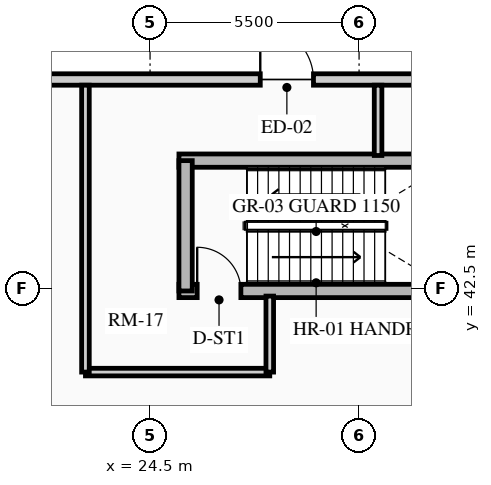
"""IFC4 building model, lengths in metres.
Left out: names, types, materials, properties, quantities, classifications, styles, units other than length and angle.
Written with IfcOpenShell. Run it as: python <this file> out.ifc"""

import sys

from ifc_helpers import new_model, si_unit, direction, frame, frame_2d, origin, place, context, subcontext, project, spatial, rectangle, extrude, source, transform, mapped, element, fill, save


model = new_model("IFC4")
c1 = context("Model", 3, precision=1e-05, world=origin(), true_north=direction((0.0, 1.0)))
c2 = subcontext(c1, "Body", "Model", "MODEL_VIEW")
j1 = project(units=[si_unit("LENGTHUNIT", "METRE"), si_unit("PLANEANGLEUNIT", "RADIAN")], contexts=[c1])
p1 = place(None, origin())
s1 = spatial("IfcSite", under=j1, at=p1, CompositionType="ELEMENT")
p2 = place(p1, origin())
s2 = spatial("IfcBuilding", under=s1, at=p2, CompositionType="ELEMENT")
p3 = place(p2, origin())
s3 = spatial("IfcBuildingStorey", under=s2, at=p3, CompositionType="ELEMENT", Elevation=0.0)
p4 = place(p3, frame((25.26, 42.435, 0.0), z_axis=(0.0, 0.0, 1.0), x_axis=(1.0, 0.0, 0.0)))
e1 = element("IfcWall", 1, at=p4, inside=s3, PredefinedType="SHEAR", context=c2, shape_type="SweptSolid", body=[
    extrude(rectangle(XDim=7.28, YDim=0.35, at=frame_2d((3.64, 0.0))), origin(), (0.0, 0.0, 1.0), 4.8),
])
m1 = source(origin(), c2, "Body", "SweptSolid", [
    extrude(rectangle(XDim=1.15, YDim=2.02, at=frame_2d((0.575, 1.01))), frame((0.0, 0.185, 0.0), z_axis=(0.0, -1.0, 0.0), x_axis=(1.0, 0.0, 0.0)), (0.0, 0.0, 1.0), 0.37),
])
p5 = place(p4, frame((0.48, 0.0, 0.0)))
e2 = element("IfcOpeningElement", 2, at=p5, cuts=e1, PredefinedType="OPENING", context=c2, shape_type="MappedRepresentation", body=[
    mapped(m1, transform((0.0, 0.0, 0.0), x_axis=(1.0, 0.0, 0.0), y_axis=(0.0, 1.0, 0.0), z_axis=(0.0, 0.0, 1.0), scale=1.0)),
])
p6 = place(p3, frame((25.26, 45.865, 0.0), z_axis=(0.0, 0.0, 1.0), x_axis=(1.0, 0.0, 0.0)))
e3 = element("IfcWall", 3, at=p6, inside=s3, PredefinedType="SHEAR", context=c2, shape_type="SweptSolid", body=[
    extrude(rectangle(XDim=7.28, YDim=0.35, at=frame_2d((3.64, 0.0))), origin(), (0.0, 0.0, 1.0), 4.8),
])
p7 = place(p3, frame((25.435, 42.435, 0.0), z_axis=(0.0, 0.0, 1.0), x_axis=(0.0, 1.0, 0.0)))
e4 = element("IfcWall", 4, at=p7, inside=s3, PredefinedType="SHEAR", context=c2, shape_type="SweptSolid", body=[
    extrude(rectangle(XDim=3.43, YDim=0.35, at=frame_2d((1.715, 0.0))), origin(), (0.0, 0.0, 1.0), 4.8),
])
p8 = place(p3, frame((3.8, 48.0, 0.0), z_axis=(0.0, 0.0, 1.0), x_axis=(1.0, 0.0, 0.0)))
e5 = element("IfcWall", 5, at=p8, inside=s3, PredefinedType="SOLIDWALL", context=c2, shape_type="SweptSolid", body=[
    extrude(rectangle(XDim=74.5, YDim=0.3, at=frame_2d((37.25, 0.0))), origin(), (0.0, 0.0, 1.0), 4.485),
])
m2 = source(origin(), c2, "Body", "SweptSolid", [
    extrude(rectangle(XDim=1.4, YDim=2.15, at=frame_2d((0.7, 1.075))), frame((0.0, 0.16, 0.0), z_axis=(0.0, -1.0, 0.0), x_axis=(1.0, 0.0, 0.0)), (0.0, 0.0, 1.0), 0.32),
])
p9 = place(p8, frame((8.2, 0.0, 0.0)))
e6 = element("IfcOpeningElement", 6, at=p9, cuts=e5, PredefinedType="OPENING", context=c2, shape_type="MappedRepresentation", body=[
    mapped(m2, transform((0.0, 0.0, 0.0), x_axis=(1.0, 0.0, 0.0), y_axis=(0.0, 1.0, 0.0), z_axis=(0.0, 0.0, 1.0), scale=1.0)),
])
m3 = source(origin(), c2, "Body", "SweptSolid", [
    extrude(rectangle(XDim=2.0, YDim=2.25, at=frame_2d((1.0, 1.125))), frame((0.0, 0.16, 0.0), z_axis=(0.0, -1.0, 0.0), x_axis=(1.0, 0.0, 0.0)), (0.0, 0.0, 1.0), 0.32),
])
p10 = place(p8, frame((13.0, 0.0, 0.0)))
e7 = element("IfcOpeningElement", 7, at=p10, cuts=e5, PredefinedType="OPENING", context=c2, shape_type="MappedRepresentation", body=[
    mapped(m3, transform((0.0, 0.0, 0.0), x_axis=(1.0, 0.0, 0.0), y_axis=(0.0, 1.0, 0.0), z_axis=(0.0, 0.0, 1.0), scale=1.0)),
])
p11 = place(p8, frame((23.6, 0.0, 0.0)))
e8 = element("IfcOpeningElement", 8, at=p11, cuts=e5, PredefinedType="OPENING", context=c2, shape_type="MappedRepresentation", body=[
    mapped(m2, transform((0.0, 0.0, 0.0), x_axis=(1.0, 0.0, 0.0), y_axis=(0.0, 1.0, 0.0), z_axis=(0.0, 0.0, 1.0), scale=1.0)),
])
p12 = place(p8, frame((27.9, 0.0, 0.0)))
e9 = element("IfcOpeningElement", 9, at=p12, cuts=e5, PredefinedType="OPENING", context=c2, shape_type="MappedRepresentation", body=[
    mapped(m3, transform((0.0, 0.0, 0.0), x_axis=(1.0, 0.0, 0.0), y_axis=(0.0, 1.0, 0.0), z_axis=(0.0, 0.0, 1.0), scale=1.0)),
])
p13 = place(p8, frame((51.0, 0.0, 0.0)))
e10 = element("IfcOpeningElement", 10, at=p13, cuts=e5, PredefinedType="OPENING", context=c2, shape_type="MappedRepresentation", body=[
    mapped(m3, transform((0.0, 0.0, 0.0), x_axis=(1.0, 0.0, 0.0), y_axis=(0.0, 1.0, 0.0), z_axis=(0.0, 0.0, 1.0), scale=1.0)),
])
p14 = place(p8, frame((57.5, 0.0, 0.0)))
e11 = element("IfcOpeningElement", 11, at=p14, cuts=e5, PredefinedType="OPENING", context=c2, shape_type="MappedRepresentation", body=[
    mapped(m3, transform((0.0, 0.0, 0.0), x_axis=(1.0, 0.0, 0.0), y_axis=(0.0, 1.0, 0.0), z_axis=(0.0, 0.0, 1.0), scale=1.0)),
])
p15 = place(p3, frame((22.8, 40.3, 0.0), z_axis=(0.0, 0.0, 1.0), x_axis=(1.0, 0.0, 0.0)))
e12 = element("IfcWall", 12, at=p15, inside=s3, PredefinedType="PARTITIONING", context=c2, shape_type="SweptSolid", body=[
    extrude(rectangle(XDim=4.85, YDim=0.2, at=frame_2d((2.425, 0.0))), origin(), (0.0, 0.0, 1.0), 4.485),
])
p16 = place(p3, frame((22.8, 40.3, 0.0), z_axis=(0.0, 0.0, 1.0), x_axis=(0.0, 1.0, 0.0)))
e13 = element("IfcWall", 13, at=p16, inside=s3, PredefinedType="PARTITIONING", context=c2, shape_type="SweptSolid", body=[
    extrude(rectangle(XDim=7.55, YDim=0.2, at=frame_2d((3.775, 0.0))), origin(), (0.0, 0.0, 1.0), 4.485),
])
p17 = place(p3, frame((27.65, 40.3, 0.0), z_axis=(0.0, 0.0, 1.0), x_axis=(0.0, 1.0, 0.0)))
e14 = element("IfcWall", 14, at=p17, inside=s3, PredefinedType="PARTITIONING", context=c2, shape_type="SweptSolid", body=[
    extrude(rectangle(XDim=2.0, YDim=0.2, at=frame_2d((1.0, 0.0))), origin(), (0.0, 0.0, 1.0), 4.485),
])
p18 = place(p3, frame((30.5, 46.0, 0.0), z_axis=(0.0, 0.0, 1.0), x_axis=(0.0, 1.0, 0.0)))
e15 = element("IfcWall", 15, at=p18, inside=s3, PredefinedType="PARTITIONING", context=c2, shape_type="SweptSolid", body=[
    extrude(rectangle(XDim=1.85, YDim=0.2, at=frame_2d((0.925, 0.0))), origin(), (0.0, 0.0, 1.0), 4.485),
])
m4 = source(origin(), c2, "Body", "SweptSolid", [
    extrude(rectangle(XDim=1.4, YDim=2.15, at=frame_2d((0.7, 1.075))), frame((0.0, 0.025, 0.0), z_axis=(0.0, -1.0, 0.0), x_axis=(1.0, 0.0, 0.0)), (0.0, 0.0, 1.0), 0.05),
])
p19 = place(p11, origin())
e16 = element("IfcDoor", 16, at=p19, inside=s3, OperationType="SINGLE_SWING_LEFT", PredefinedType="DOOR", context=c2, shape_type="MappedRepresentation", body=[
    mapped(m4, transform((0.0, 0.0, 0.0), x_axis=(1.0, 0.0, 0.0), y_axis=(0.0, 1.0, 0.0), z_axis=(0.0, 0.0, 1.0), scale=1.0)),
])
fill(e8, e16)
m5 = source(origin(), c2, "Body", "SweptSolid", [
    extrude(rectangle(XDim=1.15, YDim=2.02, at=frame_2d((0.575, 1.01))), frame((0.0, 0.025, 0.0), z_axis=(0.0, -1.0, 0.0), x_axis=(1.0, 0.0, 0.0)), (0.0, 0.0, 1.0), 0.05),
])
p20 = place(p5, origin())
e17 = element("IfcDoor", 17, at=p20, inside=s3, OperationType="SINGLE_SWING_LEFT", PredefinedType="DOOR", context=c2, shape_type="MappedRepresentation", body=[
    mapped(m5, transform((0.0, 0.0, 0.0), x_axis=(1.0, 0.0, 0.0), y_axis=(0.0, 1.0, 0.0), z_axis=(0.0, 0.0, 1.0), scale=1.0)),
])
fill(e2, e17)
save(model, sys.argv[1])
